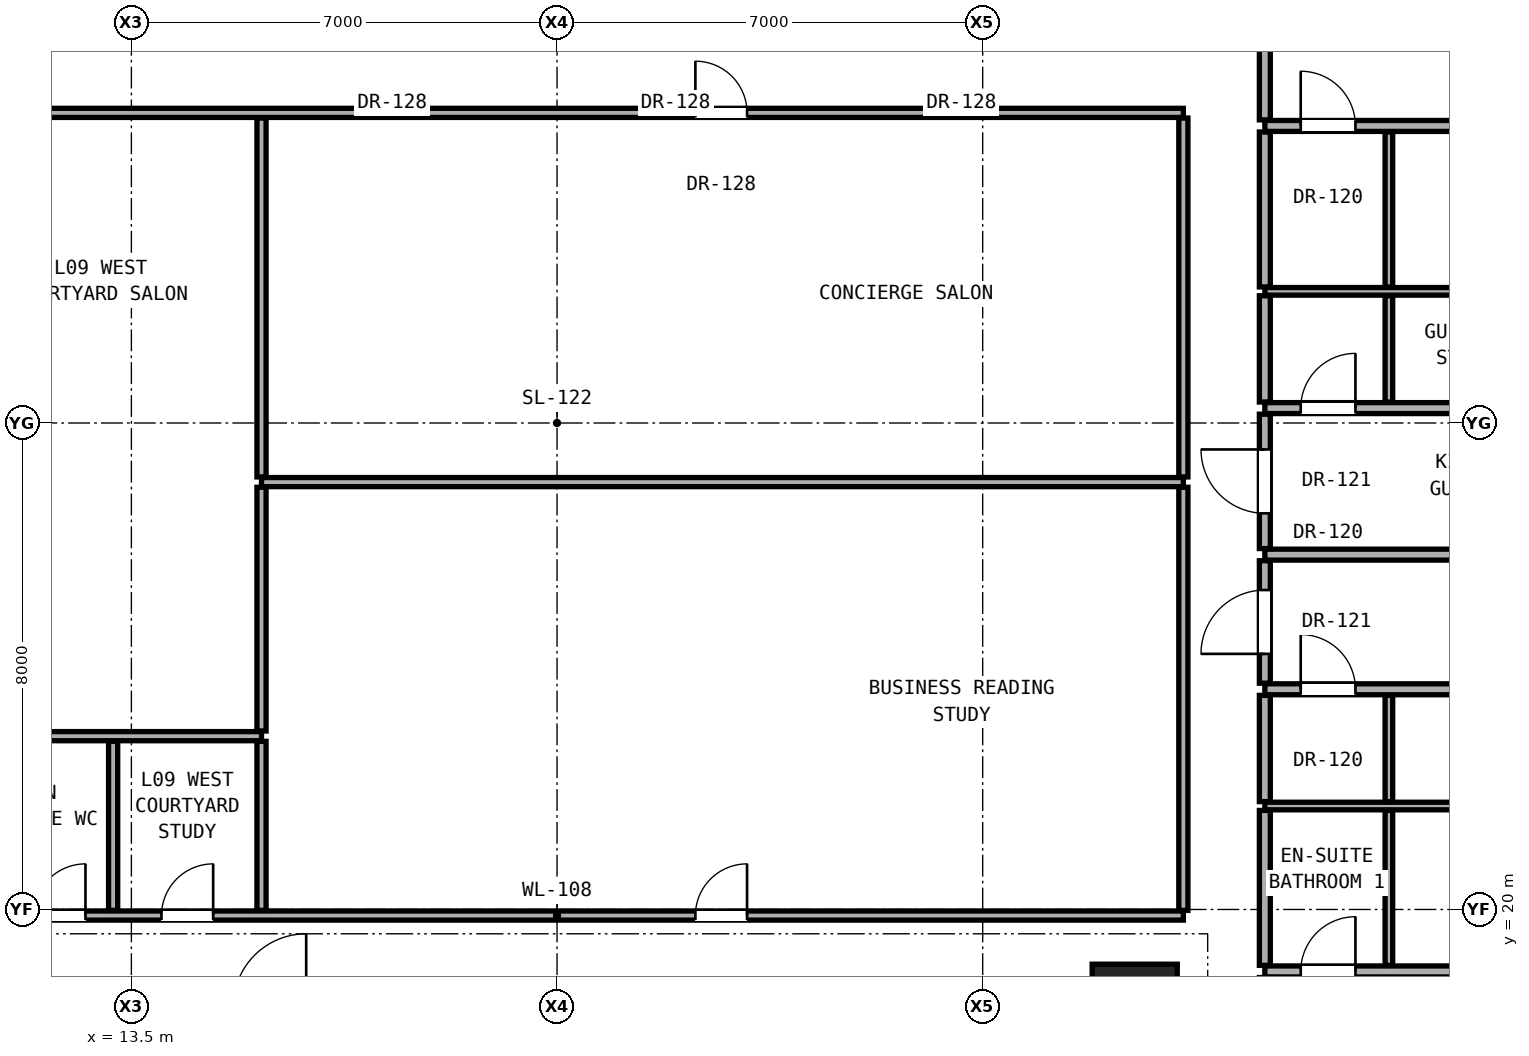
"""IFC4 building model, lengths in metres.
Left out: names, types, materials, properties, quantities, classifications, styles, units other than length and angle.
Written with IfcOpenShell. Run it as: python <this file> out.ifc"""

import sys

from ifc_helpers import new_model, si_unit, direction, frame, frame_2d, origin, origin_2d, place, context, subcontext, project, spatial, rectangle, extrude, element, fill, save


model = new_model("IFC4")
c1 = context("Model", 3, precision=1e-05, world=origin(), true_north=direction((0.0, 1.0)))
c2 = subcontext(c1, "Body", "Model", "MODEL_VIEW")
j1 = project(units=[si_unit("LENGTHUNIT", "METRE"), si_unit("PLANEANGLEUNIT", "RADIAN")], contexts=[c1])
p1 = place(None, origin())
s1 = spatial("IfcSite", under=j1, at=p1, CompositionType="ELEMENT")
p2 = place(p1, origin())
s2 = spatial("IfcBuilding", under=s1, at=p2, CompositionType="ELEMENT")
p3 = place(p2, frame((0.0, 0.0, 35.6)))
s3 = spatial("IfcBuildingStorey", under=s2, at=p3, CompositionType="ELEMENT", Elevation=35.6)
p4 = place(p3, frame((30.0, 18.4, 0.0), z_axis=(0.0, 0.0, 1.0), x_axis=(1.0, 0.0, 0.0)))
e1 = element("IfcColumn", 1, at=p4, inside=s3, PredefinedType="COLUMN", context=c2, shape_type="SweptSolid", body=[
    extrude(rectangle(XDim=1.4, YDim=1.4, at=origin_2d()), origin(), (0.0, 0.0, 1.0), 3.3),
])
p5 = place(p3, frame((32.14, 18.981, 0.0), z_axis=(0.0, 0.0, 1.0), x_axis=(1.0, 0.0, 0.0)))
e2 = element("IfcWall", 2, at=p5, inside=s3, PredefinedType="PARTITIONING", context=c2, shape_type="SweptSolid", body=[
    extrude(rectangle(XDim=10.46, YDim=0.18, at=frame_2d((5.23, 0.0))), origin(), (0.0, 0.0, 1.0), 2.125),
])
p6 = place(p5, frame((4.855, 0.0, 0.0)))
e3 = element("IfcOpeningElement", 3, at=p6, cuts=e2, PredefinedType="OPENING", context=c2, shape_type="SweptSolid", body=[
    extrude(rectangle(XDim=0.85, YDim=2.01, at=frame_2d((0.425, 1.005))), frame((0.0, 0.1, 0.0), z_axis=(0.0, -1.0, 0.0), x_axis=(1.0, 0.0, 0.0)), (0.0, 0.0, 1.0), 0.2),
])
p7 = place(p5, frame((0.59, 0.0, 0.0)))
e4 = element("IfcOpeningElement", 4, at=p7, cuts=e2, PredefinedType="OPENING", context=c2, shape_type="SweptSolid", body=[
    extrude(rectangle(XDim=0.9, YDim=2.1, at=frame_2d((0.45, 1.05))), frame((0.0, 0.1, 0.0), z_axis=(0.0, -1.0, 0.0), x_axis=(1.0, 0.0, 0.0)), (0.0, 0.0, 1.0), 0.2),
])
p8 = place(p3, frame((10.2, 19.9, 0.0), z_axis=(0.0, 0.0, 1.0), x_axis=(1.0, 0.0, 0.0)))
e5 = element("IfcWall", 5, at=p8, inside=s3, PredefinedType="PARTITIONING", context=c2, shape_type="SweptSolid", body=[
    extrude(rectangle(XDim=20.6, YDim=0.15, at=frame_2d((10.3, 0.0))), origin(), (0.0, 0.0, 1.0), 2.104),
])
p9 = place(p8, frame((1.695, 0.0, 0.0)))
e6 = element("IfcOpeningElement", 6, at=p9, cuts=e5, PredefinedType="OPENING", context=c2, shape_type="SweptSolid", body=[
    extrude(rectangle(XDim=0.85, YDim=2.01, at=frame_2d((0.425, 1.005))), frame((0.0, 0.085, 0.0), z_axis=(0.0, -1.0, 0.0), x_axis=(1.0, 0.0, 0.0)), (0.0, 0.0, 1.0), 0.17),
])
p10 = place(p8, frame((3.795, 0.0, 0.0)))
e7 = element("IfcOpeningElement", 7, at=p10, cuts=e5, PredefinedType="OPENING", context=c2, shape_type="SweptSolid", body=[
    extrude(rectangle(XDim=0.85, YDim=2.01, at=frame_2d((0.425, 1.005))), frame((0.0, 0.085, 0.0), z_axis=(0.0, -1.0, 0.0), x_axis=(1.0, 0.0, 0.0)), (0.0, 0.0, 1.0), 0.17),
])
p11 = place(p8, frame((12.575, 0.0, 0.0)))
e8 = element("IfcOpeningElement", 8, at=p11, cuts=e5, PredefinedType="OPENING", context=c2, shape_type="SweptSolid", body=[
    extrude(rectangle(XDim=0.85, YDim=2.01, at=frame_2d((0.425, 1.005))), frame((0.0, 0.085, 0.0), z_axis=(0.0, -1.0, 0.0), x_axis=(1.0, 0.0, 0.0)), (0.0, 0.0, 1.0), 0.17),
])
p12 = place(p3, frame((32.14, 21.701, 0.0), z_axis=(0.0, 0.0, 1.0), x_axis=(1.0, 0.0, 0.0)))
e9 = element("IfcWall", 9, at=p12, inside=s3, PredefinedType="PARTITIONING", context=c2, shape_type="SweptSolid", body=[
    extrude(rectangle(XDim=10.46, YDim=0.125, at=frame_2d((5.23, 0.0))), origin(), (0.0, 0.0, 1.0), 2.125),
])
p13 = place(p3, frame((10.2, 22.85, 0.0), z_axis=(0.0, 0.0, 1.0), x_axis=(1.0, 0.0, 0.0)))
e10 = element("IfcWall", 10, at=p13, inside=s3, PredefinedType="PARTITIONING", context=c2, shape_type="SweptSolid", body=[
    extrude(rectangle(XDim=5.44, YDim=0.15, at=frame_2d((2.72, 0.0))), origin(), (0.0, 0.0, 1.0), 2.104),
])
p14 = place(p3, frame((32.14, 23.621, 0.0), z_axis=(0.0, 0.0, 1.0), x_axis=(1.0, 0.0, 0.0)))
e11 = element("IfcWall", 11, at=p14, inside=s3, PredefinedType="PARTITIONING", context=c2, shape_type="SweptSolid", body=[
    extrude(rectangle(XDim=10.46, YDim=0.18, at=frame_2d((5.23, 0.0))), origin(), (0.0, 0.0, 1.0), 2.125),
])
p15 = place(p14, frame((4.855, 0.0, 0.0)))
e12 = element("IfcOpeningElement", 12, at=p15, cuts=e11, PredefinedType="OPENING", context=c2, shape_type="SweptSolid", body=[
    extrude(rectangle(XDim=0.85, YDim=2.01, at=frame_2d((0.425, 1.005))), frame((0.0, 0.1, 0.0), z_axis=(0.0, -1.0, 0.0), x_axis=(1.0, 0.0, 0.0)), (0.0, 0.0, 1.0), 0.2),
])
p16 = place(p14, frame((0.59, 0.0, 0.0)))
e13 = element("IfcOpeningElement", 13, at=p16, cuts=e11, PredefinedType="OPENING", context=c2, shape_type="SweptSolid", body=[
    extrude(rectangle(XDim=0.9, YDim=2.1, at=frame_2d((0.45, 1.05))), frame((0.0, 0.1, 0.0), z_axis=(0.0, -1.0, 0.0), x_axis=(1.0, 0.0, 0.0)), (0.0, 0.0, 1.0), 0.2),
])
p17 = place(p3, frame((32.14, 25.835, 0.0), z_axis=(0.0, 0.0, 1.0), x_axis=(1.0, 0.0, 0.0)))
e14 = element("IfcWall", 14, at=p17, inside=s3, PredefinedType="PARTITIONING", context=c2, shape_type="SweptSolid", body=[
    extrude(rectangle(XDim=10.46, YDim=0.18, at=frame_2d((5.23, 0.0))), origin(), (0.0, 0.0, 1.0), 2.125),
])
p18 = place(p3, frame((15.64, 27.028, 0.0), z_axis=(0.0, 0.0, 1.0), x_axis=(1.0, 0.0, 0.0)))
e15 = element("IfcWall", 15, at=p18, inside=s3, PredefinedType="PARTITIONING", context=c2, shape_type="SweptSolid", body=[
    extrude(rectangle(XDim=15.16, YDim=0.15, at=frame_2d((7.58, 0.0))), origin(), (0.0, 0.0, 1.0), 2.104),
])
p19 = place(p3, frame((32.14, 28.245, 0.0), z_axis=(0.0, 0.0, 1.0), x_axis=(1.0, 0.0, 0.0)))
e16 = element("IfcWall", 16, at=p19, inside=s3, PredefinedType="PARTITIONING", context=c2, shape_type="SweptSolid", body=[
    extrude(rectangle(XDim=10.46, YDim=0.18, at=frame_2d((5.23, 0.0))), origin(), (0.0, 0.0, 1.0), 2.125),
])
p20 = place(p19, frame((5.805, 0.0, 0.0)))
e17 = element("IfcOpeningElement", 17, at=p20, cuts=e16, PredefinedType="OPENING", context=c2, shape_type="SweptSolid", body=[
    extrude(rectangle(XDim=0.85, YDim=2.01, at=frame_2d((0.425, 1.005))), frame((0.0, 0.1, 0.0), z_axis=(0.0, -1.0, 0.0), x_axis=(1.0, 0.0, 0.0)), (0.0, 0.0, 1.0), 0.2),
])
p21 = place(p19, frame((0.59, 0.0, 0.0)))
e18 = element("IfcOpeningElement", 18, at=p21, cuts=e16, PredefinedType="OPENING", context=c2, shape_type="SweptSolid", body=[
    extrude(rectangle(XDim=0.9, YDim=2.1, at=frame_2d((0.45, 1.05))), frame((0.0, 0.1, 0.0), z_axis=(0.0, -1.0, 0.0), x_axis=(1.0, 0.0, 0.0)), (0.0, 0.0, 1.0), 0.2),
])
p22 = place(p3, frame((32.14, 30.165, 0.0), z_axis=(0.0, 0.0, 1.0), x_axis=(1.0, 0.0, 0.0)))
e19 = element("IfcWall", 19, at=p22, inside=s3, PredefinedType="PARTITIONING", context=c2, shape_type="SweptSolid", body=[
    extrude(rectangle(XDim=10.46, YDim=0.125, at=frame_2d((5.23, 0.0))), origin(), (0.0, 0.0, 1.0), 2.125),
])
p23 = place(p3, frame((32.14, 32.885, 0.0), z_axis=(0.0, 0.0, 1.0), x_axis=(1.0, 0.0, 0.0)))
e20 = element("IfcWall", 20, at=p23, inside=s3, PredefinedType="PARTITIONING", context=c2, shape_type="SweptSolid", body=[
    extrude(rectangle(XDim=10.46, YDim=0.18, at=frame_2d((5.23, 0.0))), origin(), (0.0, 0.0, 1.0), 2.125),
])
p24 = place(p23, frame((4.855, 0.0, 0.0)))
e21 = element("IfcOpeningElement", 21, at=p24, cuts=e20, PredefinedType="OPENING", context=c2, shape_type="SweptSolid", body=[
    extrude(rectangle(XDim=0.85, YDim=2.01, at=frame_2d((0.425, 1.005))), frame((0.0, 0.1, 0.0), z_axis=(0.0, -1.0, 0.0), x_axis=(1.0, 0.0, 0.0)), (0.0, 0.0, 1.0), 0.2),
])
p25 = place(p23, frame((0.59, 0.0, 0.0)))
e22 = element("IfcOpeningElement", 22, at=p25, cuts=e20, PredefinedType="OPENING", context=c2, shape_type="SweptSolid", body=[
    extrude(rectangle(XDim=0.9, YDim=2.1, at=frame_2d((0.45, 1.05))), frame((0.0, 0.1, 0.0), z_axis=(0.0, -1.0, 0.0), x_axis=(1.0, 0.0, 0.0)), (0.0, 0.0, 1.0), 0.2),
])
p26 = place(p3, frame((10.2, 33.1, 0.0), z_axis=(0.0, 0.0, 1.0), x_axis=(1.0, 0.0, 0.0)))
e23 = element("IfcWall", 23, at=p26, inside=s3, PredefinedType="PARTITIONING", context=c2, shape_type="SweptSolid", body=[
    extrude(rectangle(XDim=20.6, YDim=0.15, at=frame_2d((10.3, 0.0))), origin(), (0.0, 0.0, 1.0), 2.104),
])
p27 = place(p26, frame((12.575, 0.0, 0.0)))
e24 = element("IfcOpeningElement", 24, at=p27, cuts=e23, PredefinedType="OPENING", context=c2, shape_type="SweptSolid", body=[
    extrude(rectangle(XDim=0.85, YDim=2.01, at=frame_2d((0.425, 1.005))), frame((0.0, 0.085, 0.0), z_axis=(0.0, -1.0, 0.0), x_axis=(1.0, 0.0, 0.0)), (0.0, 0.0, 1.0), 0.17),
])
p28 = place(p3, frame((13.2, 19.985, 0.0), z_axis=(0.0, 0.0, 1.0), x_axis=(0.0, 1.0, 0.0)))
e25 = element("IfcWall", 25, at=p28, inside=s3, PredefinedType="PARTITIONING", context=c2, shape_type="SweptSolid", body=[
    extrude(rectangle(XDim=2.78, YDim=0.15, at=frame_2d((1.39, 0.0))), origin(), (0.0, 0.0, 1.0), 3.06),
])
p29 = place(p3, frame((15.64, 19.985, 0.0), z_axis=(0.0, 0.0, 1.0), x_axis=(0.0, 1.0, 0.0)))
e26 = element("IfcWall", 26, at=p29, inside=s3, PredefinedType="PARTITIONING", context=c2, shape_type="SweptSolid", body=[
    extrude(rectangle(XDim=2.78, YDim=0.15, at=frame_2d((1.39, 0.0))), origin(), (0.0, 0.0, 1.0), 2.589),
])
p30 = place(p3, frame((15.64, 22.935, 0.0), z_axis=(0.0, 0.0, 1.0), x_axis=(0.0, 1.0, 0.0)))
e27 = element("IfcWall", 27, at=p30, inside=s3, PredefinedType="PARTITIONING", context=c2, shape_type="SweptSolid", body=[
    extrude(rectangle(XDim=4.008, YDim=0.15, at=frame_2d((2.004, 0.0))), origin(), (0.0, 0.0, 1.0), 2.104),
])
p31 = place(p3, frame((15.64, 27.113, 0.0), z_axis=(0.0, 0.0, 1.0), x_axis=(0.0, 1.0, 0.0)))
e28 = element("IfcWall", 28, at=p31, inside=s3, PredefinedType="PARTITIONING", context=c2, shape_type="SweptSolid", body=[
    extrude(rectangle(XDim=5.902, YDim=0.15, at=frame_2d((2.951, 0.0))), origin(), (0.0, 0.0, 1.0), 2.104),
])
p32 = place(p3, frame((30.8, 19.985, 0.0), z_axis=(0.0, 0.0, 1.0), x_axis=(0.0, 1.0, 0.0)))
e29 = element("IfcWall", 29, at=p32, inside=s3, PredefinedType="PARTITIONING", context=c2, shape_type="SweptSolid", body=[
    extrude(rectangle(XDim=6.958, YDim=0.15, at=frame_2d((3.479, 0.0))), origin(), (0.0, 0.0, 1.0), 2.279),
])
p33 = place(p3, frame((30.8, 27.113, 0.0), z_axis=(0.0, 0.0, 1.0), x_axis=(0.0, 1.0, 0.0)))
e30 = element("IfcWall", 30, at=p33, inside=s3, PredefinedType="PARTITIONING", context=c2, shape_type="SweptSolid", body=[
    extrude(rectangle(XDim=5.902, YDim=0.15, at=frame_2d((2.951, 0.0))), origin(), (0.0, 0.0, 1.0), 2.279),
])
p34 = place(p3, frame((32.14, 19.081, 0.0), z_axis=(0.0, 0.0, 1.0), x_axis=(0.0, 1.0, 0.0)))
e31 = element("IfcWall", 31, at=p34, inside=s3, PredefinedType="PARTITIONING", context=c2, shape_type="SweptSolid", body=[
    extrude(rectangle(XDim=2.547, YDim=0.18, at=frame_2d((1.274, 0.0))), origin(), (0.0, 0.0, 1.0), 3.06),
])
p35 = place(p3, frame((32.14, 21.773, 0.0), z_axis=(0.0, 0.0, 1.0), x_axis=(0.0, 1.0, 0.0)))
e32 = element("IfcWall", 32, at=p35, inside=s3, PredefinedType="PARTITIONING", context=c2, shape_type="SweptSolid", body=[
    extrude(rectangle(XDim=1.748, YDim=0.18, at=frame_2d((0.874, 0.0))), origin(), (0.0, 0.0, 1.0), 3.06),
])
p36 = place(p3, frame((32.14, 23.721, 0.0), z_axis=(0.0, 0.0, 1.0), x_axis=(0.0, 1.0, 0.0)))
e33 = element("IfcWall", 33, at=p36, inside=s3, PredefinedType="PARTITIONING", context=c2, shape_type="SweptSolid", body=[
    extrude(rectangle(XDim=2.014, YDim=0.18, at=frame_2d((1.007, 0.0))), origin(), (0.0, 0.0, 1.0), 2.279),
])
p37 = place(p36, frame((0.482, 0.0, 0.0)))
e34 = element("IfcOpeningElement", 34, at=p37, cuts=e33, PredefinedType="OPENING", context=c2, shape_type="SweptSolid", body=[
    extrude(rectangle(XDim=1.05, YDim=2.2, at=frame_2d((0.525, 1.1))), frame((0.0, 0.1, 0.0), z_axis=(0.0, -1.0, 0.0), x_axis=(1.0, 0.0, 0.0)), (0.0, 0.0, 1.0), 0.2),
])
p38 = place(p3, frame((32.14, 25.935, 0.0), z_axis=(0.0, 0.0, 1.0), x_axis=(0.0, 1.0, 0.0)))
e35 = element("IfcWall", 35, at=p38, inside=s3, PredefinedType="PARTITIONING", context=c2, shape_type="SweptSolid", body=[
    extrude(rectangle(XDim=2.21, YDim=0.18, at=frame_2d((1.105, 0.0))), origin(), (0.0, 0.0, 1.0), 3.06),
])
p39 = place(p38, frame((0.58, 0.0, 0.0)))
e36 = element("IfcOpeningElement", 36, at=p39, cuts=e35, PredefinedType="OPENING", context=c2, shape_type="SweptSolid", body=[
    extrude(rectangle(XDim=1.05, YDim=2.2, at=frame_2d((0.525, 1.1))), frame((0.0, 0.1, 0.0), z_axis=(0.0, -1.0, 0.0), x_axis=(1.0, 0.0, 0.0)), (0.0, 0.0, 1.0), 0.2),
])
p40 = place(p3, frame((32.14, 28.345, 0.0), z_axis=(0.0, 0.0, 1.0), x_axis=(0.0, 1.0, 0.0)))
e37 = element("IfcWall", 37, at=p40, inside=s3, PredefinedType="PARTITIONING", context=c2, shape_type="SweptSolid", body=[
    extrude(rectangle(XDim=1.748, YDim=0.18, at=frame_2d((0.874, 0.0))), origin(), (0.0, 0.0, 1.0), 3.06),
])
p41 = place(p3, frame((32.14, 30.238, 0.0), z_axis=(0.0, 0.0, 1.0), x_axis=(0.0, 1.0, 0.0)))
e38 = element("IfcWall", 38, at=p41, inside=s3, PredefinedType="PARTITIONING", context=c2, shape_type="SweptSolid", body=[
    extrude(rectangle(XDim=2.547, YDim=0.18, at=frame_2d((1.274, 0.0))), origin(), (0.0, 0.0, 1.0), 2.279),
])
p42 = place(p3, frame((32.14, 32.985, 0.0), z_axis=(0.0, 0.0, 1.0), x_axis=(0.0, 1.0, 0.0)))
e39 = element("IfcWall", 39, at=p42, inside=s3, PredefinedType="PARTITIONING", context=c2, shape_type="SweptSolid", body=[
    extrude(rectangle(XDim=8.907, YDim=0.18, at=frame_2d((4.454, 0.0))), origin(), (0.0, 0.0, 1.0), 2.436),
])
p43 = place(p42, frame((3.928, 0.0, 0.0)))
e40 = element("IfcOpeningElement", 40, at=p43, cuts=e39, PredefinedType="OPENING", context=c2, shape_type="SweptSolid", body=[
    extrude(rectangle(XDim=1.05, YDim=2.2, at=frame_2d((0.525, 1.1))), frame((0.0, 0.1, 0.0), z_axis=(0.0, -1.0, 0.0), x_axis=(1.0, 0.0, 0.0)), (0.0, 0.0, 1.0), 0.2),
])
p44 = place(p3, frame((34.18, 19.081, 0.0), z_axis=(0.0, 0.0, 1.0), x_axis=(0.0, 1.0, 0.0)))
e41 = element("IfcWall", 41, at=p44, inside=s3, PredefinedType="PARTITIONING", context=c2, shape_type="SweptSolid", body=[
    extrude(rectangle(XDim=2.547, YDim=0.125, at=frame_2d((1.274, 0.0))), origin(), (0.0, 0.0, 1.0), 3.06),
])
for number, where, z_axis, x_axis in (
    (42, (34.18, 21.773, 0.0), (0.0, 0.0, 1.0), (0.0, 1.0, 0.0)),
    (43, (34.18, 28.345, 0.0), (0.0, 0.0, 1.0), (0.0, 1.0, 0.0)),
):
    element("IfcWall", number, at=place(p3, frame(where, z_axis=z_axis, x_axis=x_axis)), inside=s3, PredefinedType="PARTITIONING", context=c2, shape_type="SweptSolid", body=[
        extrude(rectangle(XDim=1.748, YDim=0.125, at=frame_2d((0.874, 0.0))), origin(), (0.0, 0.0, 1.0), 3.06),
    ])
p45 = place(p3, frame((34.18, 30.238, 0.0), z_axis=(0.0, 0.0, 1.0), x_axis=(0.0, 1.0, 0.0)))
e44 = element("IfcWall", 44, at=p45, inside=s3, PredefinedType="PARTITIONING", context=c2, shape_type="SweptSolid", body=[
    extrude(rectangle(XDim=2.547, YDim=0.125, at=frame_2d((1.274, 0.0))), origin(), (0.0, 0.0, 1.0), 2.279),
])
p46 = place(p9, origin())
e45 = element("IfcDoor", 45, at=p46, inside=s3, OperationType="SINGLE_SWING_RIGHT", PredefinedType="DOOR", context=c2, shape_type="SweptSolid", body=[
    extrude(rectangle(XDim=0.85, YDim=2.01, at=frame_2d((0.425, 1.005))), frame((0.0, 0.025, 0.0), z_axis=(0.0, -1.0, 0.0), x_axis=(1.0, 0.0, 0.0)), (0.0, 0.0, 1.0), 0.05),
])
fill(e6, e45)
p47 = place(p7, origin())
e46 = element("IfcDoor", 46, at=p47, inside=s3, OperationType="SINGLE_SWING_RIGHT", PredefinedType="DOOR", context=c2, shape_type="SweptSolid", body=[
    extrude(rectangle(XDim=0.9, YDim=2.1, at=frame_2d((0.45, 1.05))), frame((0.0, 0.025, 0.0), z_axis=(0.0, -1.0, 0.0), x_axis=(1.0, 0.0, 0.0)), (0.0, 0.0, 1.0), 0.05),
])
fill(e4, e46)
p48 = place(p37, origin())
e47 = element("IfcDoor", 47, at=p48, inside=s3, OperationType="SINGLE_SWING_LEFT", PredefinedType="DOOR", context=c2, shape_type="SweptSolid", body=[
    extrude(rectangle(XDim=1.05, YDim=2.2, at=frame_2d((0.525, 1.1))), frame((0.0, 0.025, 0.0), z_axis=(0.0, -1.0, 0.0), x_axis=(1.0, 0.0, 0.0)), (0.0, 0.0, 1.0), 0.05),
])
fill(e34, e47)
p49 = place(p16, origin())
e48 = element("IfcDoor", 48, at=p49, inside=s3, OperationType="SINGLE_SWING_LEFT", PredefinedType="DOOR", context=c2, shape_type="SweptSolid", body=[
    extrude(rectangle(XDim=0.9, YDim=2.1, at=frame_2d((0.45, 1.05))), frame((0.0, 0.025, 0.0), z_axis=(0.0, -1.0, 0.0), x_axis=(1.0, 0.0, 0.0)), (0.0, 0.0, 1.0), 0.05),
])
fill(e13, e48)
p50 = place(p39, origin())
e49 = element("IfcDoor", 49, at=p50, inside=s3, OperationType="SINGLE_SWING_RIGHT", PredefinedType="DOOR", context=c2, shape_type="SweptSolid", body=[
    extrude(rectangle(XDim=1.05, YDim=2.2, at=frame_2d((0.525, 1.1))), frame((0.0, 0.025, 0.0), z_axis=(0.0, -1.0, 0.0), x_axis=(1.0, 0.0, 0.0)), (0.0, 0.0, 1.0), 0.05),
])
fill(e36, e49)
p51 = place(p21, origin())
e50 = element("IfcDoor", 50, at=p51, inside=s3, OperationType="SINGLE_SWING_RIGHT", PredefinedType="DOOR", context=c2, shape_type="SweptSolid", body=[
    extrude(rectangle(XDim=0.9, YDim=2.1, at=frame_2d((0.45, 1.05))), frame((0.0, 0.025, 0.0), z_axis=(0.0, -1.0, 0.0), x_axis=(1.0, 0.0, 0.0)), (0.0, 0.0, 1.0), 0.05),
])
fill(e18, e50)
p52 = place(p25, origin())
e51 = element("IfcDoor", 51, at=p52, inside=s3, OperationType="SINGLE_SWING_LEFT", PredefinedType="DOOR", context=c2, shape_type="SweptSolid", body=[
    extrude(rectangle(XDim=0.9, YDim=2.1, at=frame_2d((0.45, 1.05))), frame((0.0, 0.025, 0.0), z_axis=(0.0, -1.0, 0.0), x_axis=(1.0, 0.0, 0.0)), (0.0, 0.0, 1.0), 0.05),
])
fill(e22, e51)
p53 = place(p10, origin())
e52 = element("IfcDoor", 52, at=p53, inside=s3, OperationType="SINGLE_SWING_RIGHT", PredefinedType="DOOR", context=c2, shape_type="SweptSolid", body=[
    extrude(rectangle(XDim=0.85, YDim=2.01, at=frame_2d((0.425, 1.005))), frame((0.0, 0.025, 0.0), z_axis=(0.0, -1.0, 0.0), x_axis=(1.0, 0.0, 0.0)), (0.0, 0.0, 1.0), 0.05),
])
fill(e7, e52)
p54 = place(p11, origin())
e53 = element("IfcDoor", 53, at=p54, inside=s3, OperationType="SINGLE_SWING_RIGHT", PredefinedType="DOOR", context=c2, shape_type="SweptSolid", body=[
    extrude(rectangle(XDim=0.85, YDim=2.01, at=frame_2d((0.425, 1.005))), frame((0.0, 0.025, 0.0), z_axis=(0.0, -1.0, 0.0), x_axis=(1.0, 0.0, 0.0)), (0.0, 0.0, 1.0), 0.05),
])
fill(e8, e53)
p55 = place(p27, origin())
e54 = element("IfcDoor", 54, at=p55, inside=s3, OperationType="SINGLE_SWING_LEFT", PredefinedType="DOOR", context=c2, shape_type="SweptSolid", body=[
    extrude(rectangle(XDim=0.85, YDim=2.01, at=frame_2d((0.425, 1.005))), frame((0.0, 0.025, 0.0), z_axis=(0.0, -1.0, 0.0), x_axis=(1.0, 0.0, 0.0)), (0.0, 0.0, 1.0), 0.05),
])
fill(e24, e54)
save(model, sys.argv[1])
